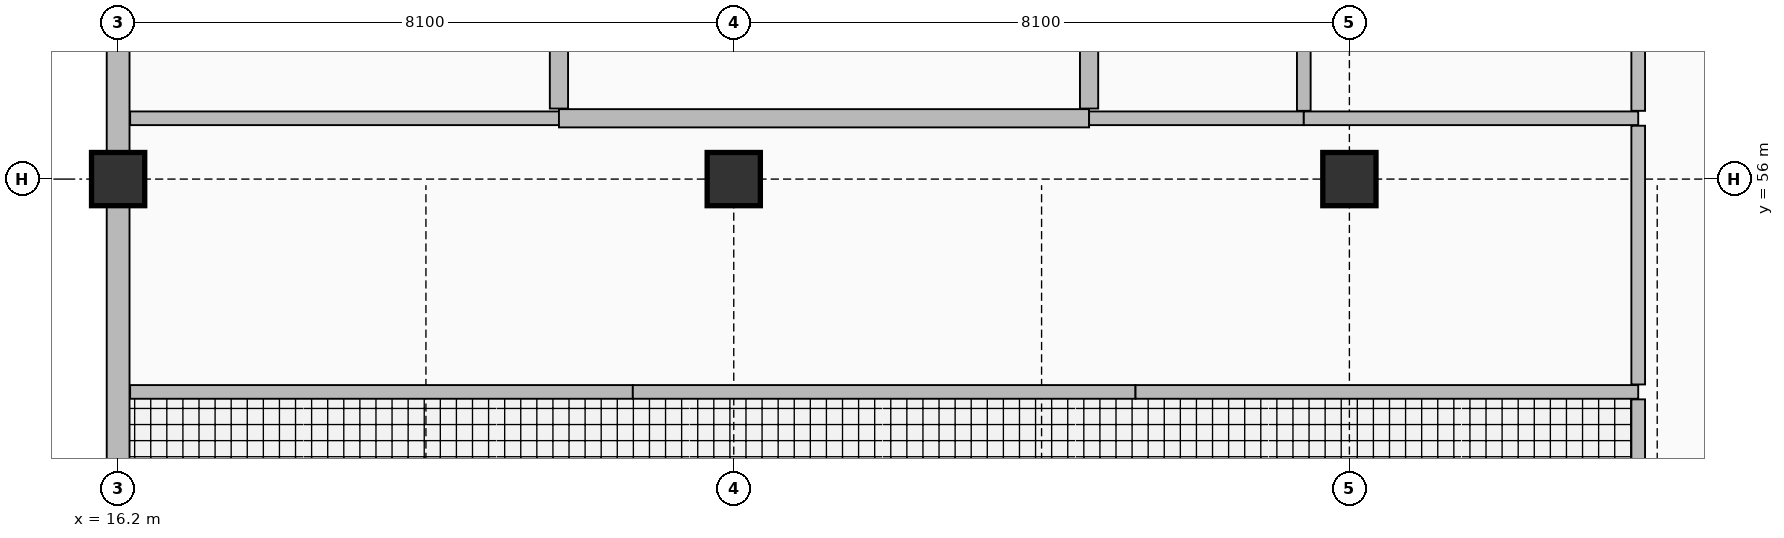
"""IFC4 building model, lengths in metres.
Left out: names, types, materials, properties, quantities, classifications, styles, units other than length and angle.
Written with IfcOpenShell. Run it as: python <this file> out.ifc"""

import sys

from ifc_helpers import new_model, si_unit, direction, frame, frame_2d, origin, origin_2d, place, context, subcontext, project, spatial, rectangle, extrude, element, fill, save


model = new_model("IFC4")
c1 = context("Model", 3, precision=1e-05, world=origin(), true_north=direction((0.0, 1.0)))
c2 = subcontext(c1, "Body", "Model", "MODEL_VIEW")
j1 = project(units=[si_unit("LENGTHUNIT", "METRE"), si_unit("PLANEANGLEUNIT", "RADIAN")], contexts=[c1])
p1 = place(None, origin())
s1 = spatial("IfcSite", under=j1, at=p1, CompositionType="ELEMENT")
p2 = place(p1, origin())
s2 = spatial("IfcBuilding", under=s1, at=p2, CompositionType="ELEMENT")
p3 = place(p2, frame((0.0, 0.0, 5.4)))
s3 = spatial("IfcBuildingStorey", under=s2, at=p3, CompositionType="ELEMENT", Elevation=5.4)
for number, where, z_axis, x_axis in (
    (1, (16.2, 56.0, 0.0), (0.0, 0.0, 1.0), (1.0, 0.0, 0.0)),
    (2, (24.3, 56.0, 0.0), (0.0, 0.0, 1.0), (1.0, 0.0, 0.0)),
    (3, (32.4, 56.0, 0.0), (0.0, 0.0, 1.0), (1.0, 0.0, 0.0)),
):
    element("IfcColumn", number, at=place(p3, frame(where, z_axis=z_axis, x_axis=x_axis)), inside=s3, PredefinedType="COLUMN", context=c2, shape_type="SweptSolid", body=[
        extrude(rectangle(XDim=0.7, YDim=0.7, at=origin_2d()), origin(), (0.0, 0.0, 1.0), 4.8),
    ])
p4 = place(p3, frame((16.2, 65.2, 0.0), z_axis=(0.0, 0.0, 1.0), x_axis=(0.0, -1.0, 0.0)))
e4 = element("IfcWall", 4, at=p4, inside=s3, PredefinedType="SOLIDWALL", context=c2, shape_type="SweptSolid", body=[
    extrude(rectangle(XDim=15.6, YDim=0.3, at=frame_2d((7.8, 0.0))), origin(), (0.0, 0.0, 1.0), 3.912),
])
for number, where, z_axis, x_axis in (
    (5, (16.358, 53.2, 0.0), (0.0, 0.0, 1.0), (1.0, 0.0, 0.0)),
    (6, (22.972, 53.2, 0.0), (0.0, 0.0, 1.0), (1.0, 0.0, 0.0)),
    (7, (29.586, 53.2, 0.0), (0.0, 0.0, 1.0), (1.0, 0.0, 0.0)),
):
    element("IfcWall", number, at=place(p3, frame(where, z_axis=z_axis, x_axis=x_axis)), inside=s3, PredefinedType="PARTITIONING", context=c2, shape_type="SweptSolid", body=[
        extrude(rectangle(XDim=6.614, YDim=0.18, at=frame_2d((3.307, 0.0))), origin(), (0.0, 0.0, 1.0), 4.52),
    ])
p5 = place(p3, frame((16.358, 56.8, 0.0), z_axis=(0.0, 0.0, 1.0), x_axis=(1.0, 0.0, 0.0)))
e8 = element("IfcWall", 8, at=p5, inside=s3, PredefinedType="PARTITIONING", context=c2, shape_type="SweptSolid", body=[
    extrude(rectangle(XDim=5.642, YDim=0.18, at=frame_2d((2.821, 0.0))), origin(), (0.0, 0.0, 1.0), 4.52),
])
p6 = place(p5, frame((2.271, 0.0, 0.0)))
e9 = element("IfcOpeningElement", 9, at=p6, cuts=e8, PredefinedType="OPENING", context=c2, shape_type="SweptSolid", body=[
    extrude(rectangle(XDim=1.1, YDim=2.2, at=frame_2d((0.55, 1.1))), frame((0.0, 0.1, 0.0), z_axis=(0.0, -1.0, 0.0), x_axis=(1.0, 0.0, 0.0)), (0.0, 0.0, 1.0), 0.2),
])
p7 = place(p3, frame((22.0, 56.8, 0.0), z_axis=(0.0, 0.0, 1.0), x_axis=(1.0, 0.0, 0.0)))
e10 = element("IfcWall", 10, at=p7, inside=s3, PredefinedType="PARTITIONING", context=c2, shape_type="SweptSolid", body=[
    extrude(rectangle(XDim=6.975, YDim=0.24, at=frame_2d((3.488, 0.0))), origin(), (0.0, 0.0, 1.0), 4.52),
])
p8 = place(p7, frame((4.003, 0.0, 0.0)))
e11 = element("IfcOpeningElement", 11, at=p8, cuts=e10, PredefinedType="OPENING", context=c2, shape_type="SweptSolid", body=[
    extrude(rectangle(XDim=1.2, YDim=2.3, at=frame_2d((0.6, 1.15))), frame((0.0, 0.13, 0.0), z_axis=(0.0, -1.0, 0.0), x_axis=(1.0, 0.0, 0.0)), (0.0, 0.0, 1.0), 0.26),
])
p9 = place(p3, frame((28.975, 56.8, 0.0), z_axis=(0.0, 0.0, 1.0), x_axis=(1.0, 0.0, 0.0)))
e12 = element("IfcWall", 12, at=p9, inside=s3, PredefinedType="PARTITIONING", context=c2, shape_type="SweptSolid", body=[
    extrude(rectangle(XDim=2.825, YDim=0.18, at=frame_2d((1.413, 0.0))), origin(), (0.0, 0.0, 1.0), 4.52),
])
p10 = place(p9, frame((0.636, 0.0, 0.0)))
e13 = element("IfcOpeningElement", 13, at=p10, cuts=e12, PredefinedType="OPENING", context=c2, shape_type="SweptSolid", body=[
    extrude(rectangle(XDim=1.1, YDim=2.2, at=frame_2d((0.55, 1.1))), frame((0.0, 0.1, 0.0), z_axis=(0.0, -1.0, 0.0), x_axis=(1.0, 0.0, 0.0)), (0.0, 0.0, 1.0), 0.2),
])
p11 = place(p3, frame((31.8, 56.8, 0.0), z_axis=(0.0, 0.0, 1.0), x_axis=(1.0, 0.0, 0.0)))
e14 = element("IfcWall", 14, at=p11, inside=s3, PredefinedType="PARTITIONING", context=c2, shape_type="SweptSolid", body=[
    extrude(rectangle(XDim=4.4, YDim=0.18, at=frame_2d((2.2, 0.0))), origin(), (0.0, 0.0, 1.0), 4.52),
])
p12 = place(p3, frame((22.0, 56.928, 0.0), z_axis=(0.0, 0.0, 1.0), x_axis=(0.0, 1.0, 0.0)))
e15 = element("IfcWall", 15, at=p12, inside=s3, PredefinedType="PARTITIONING", context=c2, shape_type="SweptSolid", body=[
    extrude(rectangle(XDim=3.164, YDim=0.24, at=frame_2d((1.582, 0.0))), origin(), (0.0, 0.0, 1.0), 4.52),
])
p13 = place(p12, frame((1.082, 0.0, 0.0)))
e16 = element("IfcOpeningElement", 16, at=p13, cuts=e15, PredefinedType="OPENING", context=c2, shape_type="SweptSolid", body=[
    extrude(rectangle(XDim=1.0, YDim=2.2, at=frame_2d((0.5, 1.1))), frame((0.0, 0.13, 0.0), z_axis=(0.0, -1.0, 0.0), x_axis=(1.0, 0.0, 0.0)), (0.0, 0.0, 1.0), 0.26),
])
p14 = place(p3, frame((28.975, 56.928, 0.0), z_axis=(0.0, 0.0, 1.0), x_axis=(0.0, 1.0, 0.0)))
e17 = element("IfcWall", 17, at=p14, inside=s3, PredefinedType="PARTITIONING", context=c2, shape_type="SweptSolid", body=[
    extrude(rectangle(XDim=3.164, YDim=0.24, at=frame_2d((1.582, 0.0))), origin(), (0.0, 0.0, 1.0), 4.52),
])
p15 = place(p3, frame((31.8, 56.898, 0.0), z_axis=(0.0, 0.0, 1.0), x_axis=(0.0, 1.0, 0.0)))
e18 = element("IfcWall", 18, at=p15, inside=s3, PredefinedType="PARTITIONING", context=c2, shape_type="SweptSolid", body=[
    extrude(rectangle(XDim=3.194, YDim=0.18, at=frame_2d((1.597, 0.0))), origin(), (0.0, 0.0, 1.0), 4.52),
])
p16 = place(p3, frame((36.2, 34.098, 0.0), z_axis=(0.0, 0.0, 1.0), x_axis=(0.0, 1.0, 0.0)))
e19 = element("IfcWall", 19, at=p16, inside=s3, PredefinedType="PARTITIONING", context=c2, shape_type="SweptSolid", body=[
    extrude(rectangle(XDim=19.004, YDim=0.18, at=frame_2d((9.502, 0.0))), origin(), (0.0, 0.0, 1.0), 4.105),
])
p17 = place(p16, frame((8.952, 0.0, 0.0)))
e20 = element("IfcOpeningElement", 20, at=p17, cuts=e19, PredefinedType="OPENING", context=c2, shape_type="SweptSolid", body=[
    extrude(rectangle(XDim=1.1, YDim=2.2, at=frame_2d((0.55, 1.1))), frame((0.0, 0.1, 0.0), z_axis=(0.0, -1.0, 0.0), x_axis=(1.0, 0.0, 0.0)), (0.0, 0.0, 1.0), 0.2),
])
p18 = place(p3, frame((36.2, 53.298, 0.0), z_axis=(0.0, 0.0, 1.0), x_axis=(0.0, 1.0, 0.0)))
e21 = element("IfcWall", 21, at=p18, inside=s3, PredefinedType="PARTITIONING", context=c2, shape_type="SweptSolid", body=[
    extrude(rectangle(XDim=3.404, YDim=0.18, at=frame_2d((1.702, 0.0))), origin(), (0.0, 0.0, 1.0), 4.158),
])
p19 = place(p18, frame((1.152, 0.0, 0.0)))
e22 = element("IfcOpeningElement", 22, at=p19, cuts=e21, PredefinedType="OPENING", context=c2, shape_type="SweptSolid", body=[
    extrude(rectangle(XDim=1.1, YDim=2.2, at=frame_2d((0.55, 1.1))), frame((0.0, 0.1, 0.0), z_axis=(0.0, -1.0, 0.0), x_axis=(1.0, 0.0, 0.0)), (0.0, 0.0, 1.0), 0.2),
])
p20 = place(p3, frame((36.2, 56.898, 0.0), z_axis=(0.0, 0.0, 1.0), x_axis=(0.0, 1.0, 0.0)))
e23 = element("IfcWall", 23, at=p20, inside=s3, PredefinedType="PARTITIONING", context=c2, shape_type="SweptSolid", body=[
    extrude(rectangle(XDim=3.404, YDim=0.18, at=frame_2d((1.702, 0.0))), origin(), (0.0, 0.0, 1.0), 4.52),
])
p21 = place(p20, frame((1.202, 0.0, 0.0)))
e24 = element("IfcOpeningElement", 24, at=p21, cuts=e23, PredefinedType="OPENING", context=c2, shape_type="SweptSolid", body=[
    extrude(rectangle(XDim=1.0, YDim=2.15, at=frame_2d((0.5, 1.075))), frame((0.0, 0.1, 0.0), z_axis=(0.0, -1.0, 0.0), x_axis=(1.0, 0.0, 0.0)), (0.0, 0.0, 1.0), 0.2),
])
p22 = place(p6, frame((1.1, 0.0, 0.0), z_axis=(0.0, 0.0, 1.0), x_axis=(-1.0, 0.0, 0.0)))
e25 = element("IfcDoor", 25, at=p22, inside=s3, OperationType="SINGLE_SWING_RIGHT", PredefinedType="DOOR", context=c2, shape_type="SweptSolid", body=[
    extrude(rectangle(XDim=1.1, YDim=2.2, at=frame_2d((0.55, 1.1))), frame((0.0, 0.025, 0.0), z_axis=(0.0, -1.0, 0.0), x_axis=(1.0, 0.0, 0.0)), (0.0, 0.0, 1.0), 0.05),
])
fill(e9, e25)
p23 = place(p8, frame((1.2, 0.0, 0.0), z_axis=(0.0, 0.0, 1.0), x_axis=(-1.0, 0.0, 0.0)))
e26 = element("IfcDoor", 26, at=p23, inside=s3, OperationType="SINGLE_SWING_LEFT", PredefinedType="DOOR", context=c2, shape_type="SweptSolid", body=[
    extrude(rectangle(XDim=1.2, YDim=2.3, at=frame_2d((0.6, 1.15))), frame((0.0, 0.025, 0.0), z_axis=(0.0, -1.0, 0.0), x_axis=(1.0, 0.0, 0.0)), (0.0, 0.0, 1.0), 0.05),
])
fill(e11, e26)
p24 = place(p10, frame((1.1, 0.0, 0.0), z_axis=(0.0, 0.0, 1.0), x_axis=(-1.0, 0.0, 0.0)))
e27 = element("IfcDoor", 27, at=p24, inside=s3, OperationType="SINGLE_SWING_LEFT", PredefinedType="DOOR", context=c2, shape_type="SweptSolid", body=[
    extrude(rectangle(XDim=1.1, YDim=2.2, at=frame_2d((0.55, 1.1))), frame((0.0, 0.025, 0.0), z_axis=(0.0, -1.0, 0.0), x_axis=(1.0, 0.0, 0.0)), (0.0, 0.0, 1.0), 0.05),
])
fill(e13, e27)
p25 = place(p19, origin())
e28 = element("IfcDoor", 28, at=p25, inside=s3, OperationType="SINGLE_SWING_LEFT", PredefinedType="DOOR", context=c2, shape_type="SweptSolid", body=[
    extrude(rectangle(XDim=1.1, YDim=2.2, at=frame_2d((0.55, 1.1))), frame((0.0, 0.025, 0.0), z_axis=(0.0, -1.0, 0.0), x_axis=(1.0, 0.0, 0.0)), (0.0, 0.0, 1.0), 0.05),
])
fill(e22, e28)
save(model, sys.argv[1])
